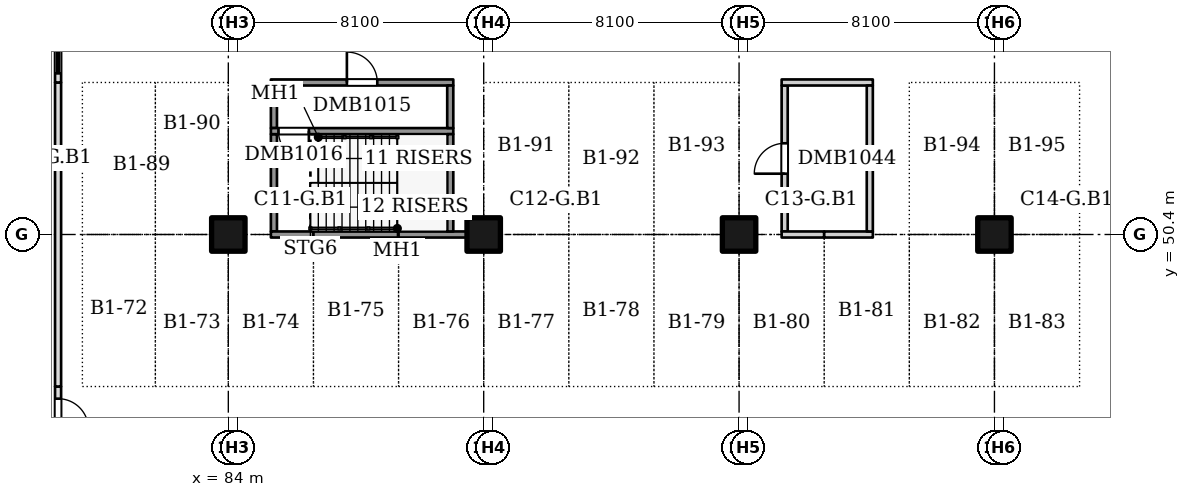
"""IFC4 building model, lengths in metres.
Left out: names, types, materials, properties, quantities, classifications, styles, units other than length and angle.
Written with IfcOpenShell. Run it as: python <this file> out.ifc"""

import sys

from ifc_helpers import new_model, si_unit, direction, frame, frame_2d, origin, origin_2d, place, context, subcontext, project, spatial, rectangle, extrude, element, fill, save


model = new_model("IFC4")
c1 = context("Model", 3, precision=1e-05, world=origin(), true_north=direction((0.0, 1.0)))
c2 = subcontext(c1, "Body", "Model", "MODEL_VIEW")
j1 = project(units=[si_unit("LENGTHUNIT", "METRE"), si_unit("PLANEANGLEUNIT", "RADIAN")], contexts=[c1])
p1 = place(None, origin())
s1 = spatial("IfcSite", under=j1, at=p1, CompositionType="ELEMENT")
p2 = place(p1, origin())
s2 = spatial("IfcBuilding", under=s1, at=p2, CompositionType="ELEMENT")
p3 = place(p2, frame((0.0, 0.0, -4.0)))
s3 = spatial("IfcBuildingStorey", under=s2, at=p3, CompositionType="ELEMENT", Elevation=-4.0)
for number, where, z_axis, x_axis in (
    (1, (84.0, 50.4, 0.0), (0.0, 0.0, 1.0), (1.0, 0.0, 0.0)),
    (2, (92.4, 50.4, 0.0), (0.0, 0.0, 1.0), (1.0, 0.0, 0.0)),
    (3, (100.8, 50.4, 0.0), (0.0, 0.0, 1.0), (1.0, 0.0, 0.0)),
    (4, (109.2, 50.4, 0.0), (0.0, 0.0, 1.0), (1.0, 0.0, 0.0)),
):
    element("IfcColumn", number, at=place(p3, frame(where, z_axis=z_axis, x_axis=x_axis)), inside=s3, PredefinedType="COLUMN", context=c2, shape_type="SweptSolid", body=[
        extrude(rectangle(XDim=1.1, YDim=1.1, at=origin_2d()), origin(), (0.0, 0.0, 1.0), 3.6),
    ])
p4 = place(p3, frame((85.5, 50.5, 0.0), z_axis=(0.0, 0.0, 1.0), x_axis=(0.0, 1.0, 0.0)))
e5 = element("IfcWall", 5, at=p4, inside=s3, PredefinedType="SOLIDWALL", context=c2, shape_type="SweptSolid", body=[
    extrude(rectangle(XDim=3.2, YDim=0.2, at=frame_2d((1.6, 0.0))), origin(), (0.0, 0.0, 1.0), 4.0),
])
for number, where, z_axis, x_axis in (
    (6, (85.4, 50.4, 0.0), (0.0, 0.0, 1.0), (1.0, 0.0, 0.0)),
    (7, (85.5, 53.9, 0.0), (0.0, 0.0, 1.0), (0.0, 1.0, 0.0)),
):
    element("IfcWall", number, at=place(p3, frame(where, z_axis=z_axis, x_axis=x_axis)), inside=s3, PredefinedType="SOLIDWALL", context=c2, shape_type="SweptSolid", body=[
        extrude(rectangle(XDim=1.4, YDim=0.2, at=frame_2d((0.7, 0.0))), origin(), (0.0, 0.0, 1.0), 4.0),
    ])
p5 = place(p3, frame((85.4, 53.8, 0.0), z_axis=(0.0, 0.0, 1.0), x_axis=(1.0, 0.0, 0.0)))
e8 = element("IfcWall", 8, at=p5, inside=s3, PredefinedType="SOLIDWALL", context=c2, shape_type="SweptSolid", body=[
    extrude(rectangle(XDim=6.0, YDim=0.2, at=frame_2d((3.0, 0.0))), origin(), (0.0, 0.0, 1.0), 4.0),
])
p6 = place(p5, frame((0.25, 0.0, 0.0)))
e9 = element("IfcOpeningElement", 9, at=p6, cuts=e8, PredefinedType="OPENING", context=c2, shape_type="SweptSolid", body=[
    extrude(rectangle(XDim=1.0, YDim=2.1, at=frame_2d((0.5, 1.05))), frame((0.0, 0.11, 0.0), z_axis=(0.0, -1.0, 0.0), x_axis=(1.0, 0.0, 0.0)), (0.0, 0.0, 1.0), 0.22),
])
p7 = place(p3, frame((85.4, 55.4, 0.0), z_axis=(0.0, 0.0, 1.0), x_axis=(1.0, 0.0, 0.0)))
e10 = element("IfcWall", 10, at=p7, inside=s3, PredefinedType="SOLIDWALL", context=c2, shape_type="SweptSolid", body=[
    extrude(rectangle(XDim=6.0, YDim=0.2, at=frame_2d((3.0, 0.0))), origin(), (0.0, 0.0, 1.0), 4.0),
])
p8 = place(p7, frame((2.5, 0.0, 0.0)))
e11 = element("IfcOpeningElement", 11, at=p8, cuts=e10, PredefinedType="OPENING", context=c2, shape_type="SweptSolid", body=[
    extrude(rectangle(XDim=1.0, YDim=2.1, at=frame_2d((0.5, 1.05))), frame((0.0, 0.11, 0.0), z_axis=(0.0, -1.0, 0.0), x_axis=(1.0, 0.0, 0.0)), (0.0, 0.0, 1.0), 0.22),
])
p9 = place(p3, frame((86.8, 50.4, 0.0), z_axis=(0.0, 0.0, 1.0), x_axis=(1.0, 0.0, 0.0)))
e12 = element("IfcWall", 12, at=p9, inside=s3, PredefinedType="SOLIDWALL", context=c2, shape_type="SweptSolid", body=[
    extrude(rectangle(XDim=2.8, YDim=0.2, at=frame_2d((1.4, 0.0))), origin(), (0.0, 0.0, 1.0), 4.0),
])
p10 = place(p3, frame((89.6, 50.4, 0.0), z_axis=(0.0, 0.0, 1.0), x_axis=(1.0, 0.0, 0.0)))
e13 = element("IfcWall", 13, at=p10, inside=s3, PredefinedType="SOLIDWALL", context=c2, shape_type="SweptSolid", body=[
    extrude(rectangle(XDim=2.25, YDim=0.2, at=frame_2d((1.125, 0.0))), origin(), (0.0, 0.0, 1.0), 4.0),
])
p11 = place(p3, frame((91.3, 50.5, 0.0), z_axis=(0.0, 0.0, 1.0), x_axis=(0.0, 1.0, 0.0)))
e14 = element("IfcWall", 14, at=p11, inside=s3, PredefinedType="SOLIDWALL", context=c2, shape_type="SweptSolid", body=[
    extrude(rectangle(XDim=3.2, YDim=0.2, at=frame_2d((1.6, 0.0))), origin(), (0.0, 0.0, 1.0), 4.0),
])
p12 = place(p3, frame((91.3, 53.9, 0.0), z_axis=(0.0, 0.0, 1.0), x_axis=(0.0, 1.0, 0.0)))
e15 = element("IfcWall", 15, at=p12, inside=s3, PredefinedType="SOLIDWALL", context=c2, shape_type="SweptSolid", body=[
    extrude(rectangle(XDim=1.4, YDim=0.2, at=frame_2d((0.7, 0.0))), origin(), (0.0, 0.0, 1.0), 4.0),
])
p13 = place(p3, frame((102.3, 50.5, 0.0), z_axis=(0.0, 0.0, 1.0), x_axis=(0.0, 1.0, 0.0)))
e16 = element("IfcWall", 16, at=p13, inside=s3, PredefinedType="PARTITIONING", context=c2, shape_type="SweptSolid", body=[
    extrude(rectangle(XDim=4.8, YDim=0.2, at=frame_2d((2.4, 0.0))), origin(), (0.0, 0.0, 1.0), 3.6),
])
p14 = place(p13, frame((1.9, 0.0, 0.0)))
e17 = element("IfcOpeningElement", 17, at=p14, cuts=e16, PredefinedType="OPENING", context=c2, shape_type="SweptSolid", body=[
    extrude(rectangle(XDim=1.0, YDim=2.1, at=frame_2d((0.5, 1.05))), frame((0.0, 0.11, 0.0), z_axis=(0.0, -1.0, 0.0), x_axis=(1.0, 0.0, 0.0)), (0.0, 0.0, 1.0), 0.22),
])
p15 = place(p3, frame((102.2, 50.4, 0.0), z_axis=(0.0, 0.0, 1.0), x_axis=(1.0, 0.0, 0.0)))
e18 = element("IfcWall", 18, at=p15, inside=s3, PredefinedType="PARTITIONING", context=c2, shape_type="SweptSolid", body=[
    extrude(rectangle(XDim=1.4, YDim=0.2, at=frame_2d((0.7, 0.0))), origin(), (0.0, 0.0, 1.0), 3.6),
])
p16 = place(p3, frame((102.2, 55.4, 0.0), z_axis=(0.0, 0.0, 1.0), x_axis=(1.0, 0.0, 0.0)))
e19 = element("IfcWall", 19, at=p16, inside=s3, PredefinedType="PARTITIONING", context=c2, shape_type="SweptSolid", body=[
    extrude(rectangle(XDim=3.0, YDim=0.2, at=frame_2d((1.5, 0.0))), origin(), (0.0, 0.0, 1.0), 3.6),
])
p17 = place(p3, frame((103.6, 50.4, 0.0), z_axis=(0.0, 0.0, 1.0), x_axis=(1.0, 0.0, 0.0)))
e20 = element("IfcWall", 20, at=p17, inside=s3, PredefinedType="PARTITIONING", context=c2, shape_type="SweptSolid", body=[
    extrude(rectangle(XDim=1.6, YDim=0.2, at=frame_2d((0.8, 0.0))), origin(), (0.0, 0.0, 1.0), 3.6),
])
p18 = place(p3, frame((105.1, 50.5, 0.0), z_axis=(0.0, 0.0, 1.0), x_axis=(0.0, 1.0, 0.0)))
e21 = element("IfcWall", 21, at=p18, inside=s3, PredefinedType="PARTITIONING", context=c2, shape_type="SweptSolid", body=[
    extrude(rectangle(XDim=4.8, YDim=0.2, at=frame_2d((2.4, 0.0))), origin(), (0.0, 0.0, 1.0), 3.6),
])
p19 = place(p3, frame((78.4, 38.6, 0.0), z_axis=(0.0, 0.0, 1.0), x_axis=(0.0, 1.0, 0.0)))
e22 = element("IfcWall", 22, at=p19, inside=s3, PredefinedType="PARTITIONING", context=c2, shape_type="SweptSolid", body=[
    extrude(rectangle(XDim=6.8, YDim=0.2, at=frame_2d((3.4, 0.0))), origin(), (0.0, 0.0, 1.0), 3.6),
])
p20 = place(p19, frame((0.3, 0.0, 0.0)))
e23 = element("IfcOpeningElement", 23, at=p20, cuts=e22, PredefinedType="OPENING", context=c2, shape_type="SweptSolid", body=[
    extrude(rectangle(XDim=4.8, YDim=2.4, at=frame_2d((2.4, 1.2))), frame((0.0, 0.11, 0.0), z_axis=(0.0, -1.0, 0.0), x_axis=(1.0, 0.0, 0.0)), (0.0, 0.0, 1.0), 0.22),
])
p21 = place(p19, frame((5.4, 0.0, 0.0)))
e24 = element("IfcOpeningElement", 24, at=p21, cuts=e22, PredefinedType="OPENING", context=c2, shape_type="SweptSolid", body=[
    extrude(rectangle(XDim=1.0, YDim=2.1, at=frame_2d((0.5, 1.05))), frame((0.0, 0.11, 0.0), z_axis=(0.0, -1.0, 0.0), x_axis=(1.0, 0.0, 0.0)), (0.0, 0.0, 1.0), 0.22),
])
p22 = place(p3, frame((78.4, 45.4, 0.0), z_axis=(0.0, 0.0, 1.0), x_axis=(0.0, 1.0, 0.0)))
e25 = element("IfcWall", 25, at=p22, inside=s3, PredefinedType="PARTITIONING", context=c2, shape_type="SweptSolid", body=[
    extrude(rectangle(XDim=10.0, YDim=0.2, at=frame_2d((5.0, 0.0))), origin(), (0.0, 0.0, 1.0), 3.6),
])
p23 = place(p3, frame((78.4, 55.4, 0.0), z_axis=(0.0, 0.0, 1.0), x_axis=(0.0, 1.0, 0.0)))
e26 = element("IfcWall", 26, at=p23, inside=s3, PredefinedType="PARTITIONING", context=c2, shape_type="SweptSolid", body=[
    extrude(rectangle(XDim=6.8, YDim=0.2, at=frame_2d((3.4, 0.0))), origin(), (0.0, 0.0, 1.0), 3.6),
])
p24 = place(p23, frame((0.3, 0.0, 0.0)))
e27 = element("IfcOpeningElement", 27, at=p24, cuts=e26, PredefinedType="OPENING", context=c2, shape_type="SweptSolid", body=[
    extrude(rectangle(XDim=4.8, YDim=2.4, at=frame_2d((2.4, 1.2))), frame((0.0, 0.11, 0.0), z_axis=(0.0, -1.0, 0.0), x_axis=(1.0, 0.0, 0.0)), (0.0, 0.0, 1.0), 0.22),
])
p25 = place(p23, frame((5.4, 0.0, 0.0)))
e28 = element("IfcOpeningElement", 28, at=p25, cuts=e26, PredefinedType="OPENING", context=c2, shape_type="SweptSolid", body=[
    extrude(rectangle(XDim=1.0, YDim=2.1, at=frame_2d((0.5, 1.05))), frame((0.0, 0.11, 0.0), z_axis=(0.0, -1.0, 0.0), x_axis=(1.0, 0.0, 0.0)), (0.0, 0.0, 1.0), 0.22),
])
p26 = place(p8, origin())
e29 = element("IfcDoor", 29, at=p26, inside=s3, OperationType="SINGLE_SWING_LEFT", PredefinedType="DOOR", context=c2, shape_type="SweptSolid", body=[
    extrude(rectangle(XDim=1.0, YDim=2.1, at=frame_2d((0.5, 1.05))), frame((0.0, 0.025, 0.0), z_axis=(0.0, -1.0, 0.0), x_axis=(1.0, 0.0, 0.0)), (0.0, 0.0, 1.0), 0.05),
])
fill(e11, e29)
p27 = place(p6, frame((1.0, 0.0, 0.0), z_axis=(0.0, 0.0, 1.0), x_axis=(-1.0, 0.0, 0.0)))
e30 = element("IfcDoor", 30, at=p27, inside=s3, OperationType="SINGLE_SWING_LEFT", PredefinedType="DOOR", context=c2, shape_type="SweptSolid", body=[
    extrude(rectangle(XDim=1.0, YDim=2.1, at=frame_2d((0.5, 1.05))), frame((0.0, 0.025, 0.0), z_axis=(0.0, -1.0, 0.0), x_axis=(1.0, 0.0, 0.0)), (0.0, 0.0, 1.0), 0.05),
])
fill(e9, e30)
p28 = place(p14, origin())
e31 = element("IfcDoor", 31, at=p28, inside=s3, OperationType="SINGLE_SWING_LEFT", PredefinedType="DOOR", context=c2, shape_type="SweptSolid", body=[
    extrude(rectangle(XDim=1.0, YDim=2.1, at=frame_2d((0.5, 1.05))), frame((0.0, 0.025, 0.0), z_axis=(0.0, -1.0, 0.0), x_axis=(1.0, 0.0, 0.0)), (0.0, 0.0, 1.0), 0.05),
])
fill(e17, e31)
p29 = place(p21, frame((1.0, 0.0, 0.0), z_axis=(0.0, 0.0, 1.0), x_axis=(-1.0, 0.0, 0.0)))
e32 = element("IfcDoor", 32, at=p29, inside=s3, OperationType="SINGLE_SWING_RIGHT", PredefinedType="DOOR", context=c2, shape_type="SweptSolid", body=[
    extrude(rectangle(XDim=1.0, YDim=2.1, at=frame_2d((0.5, 1.05))), frame((0.0, 0.025, 0.0), z_axis=(0.0, -1.0, 0.0), x_axis=(1.0, 0.0, 0.0)), (0.0, 0.0, 1.0), 0.05),
])
fill(e24, e32)
p30 = place(p24, origin())
e33 = element("IfcDoor", 33, at=p30, inside=s3, OperationType="ROLLINGUP", PredefinedType="GATE", context=c2, shape_type="SweptSolid", body=[
    extrude(rectangle(XDim=4.8, YDim=2.4, at=frame_2d((2.4, 1.2))), frame((0.0, 0.025, 0.0), z_axis=(0.0, -1.0, 0.0), x_axis=(1.0, 0.0, 0.0)), (0.0, 0.0, 1.0), 0.05),
])
fill(e27, e33)
save(model, sys.argv[1])
